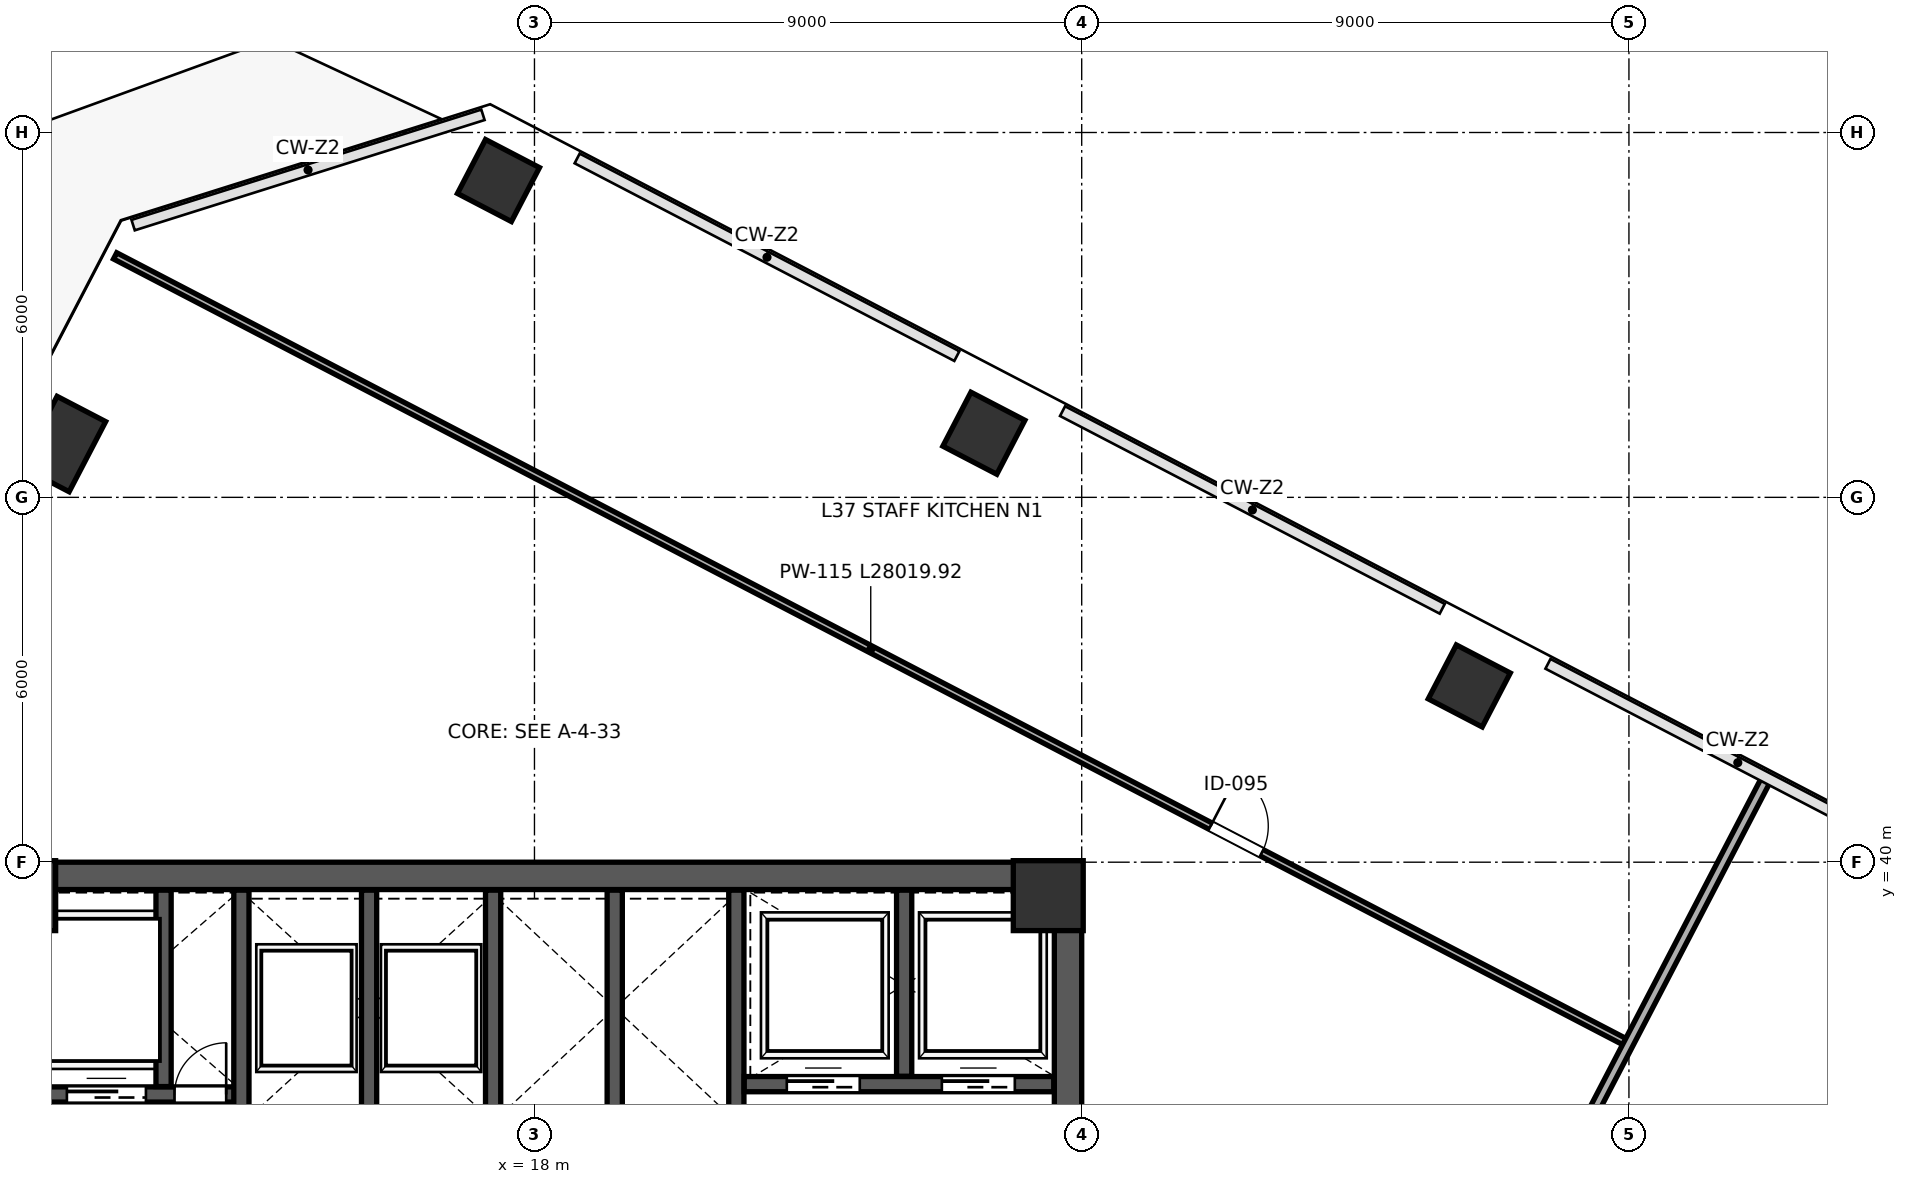
"""IFC4 building model, lengths in metres.
Left out: names, types, materials, properties, quantities, classifications, styles, units other than length and angle.
Written with IfcOpenShell. Run it as: python <this file> out.ifc"""

import sys

from ifc_helpers import new_model, si_unit, direction, frame, frame_2d, origin, origin_2d, place, context, subcontext, project, spatial, rectangle, extrude, source, transform, mapped, element, fill, save


model = new_model("IFC4")
c1 = context("Model", 3, precision=1e-05, world=origin(), true_north=direction((0.0, 1.0)))
c2 = subcontext(c1, "Body", "Model", "MODEL_VIEW")
j1 = project(units=[si_unit("LENGTHUNIT", "METRE"), si_unit("PLANEANGLEUNIT", "RADIAN")], contexts=[c1])
p1 = place(None, origin())
s1 = spatial("IfcSite", under=j1, at=p1, CompositionType="ELEMENT")
p2 = place(p1, origin())
s2 = spatial("IfcBuilding", under=s1, at=p2, CompositionType="ELEMENT")
p3 = place(p2, frame((0.0, 0.0, 166.6)))
s3 = spatial("IfcBuildingStorey", under=s2, at=p3, CompositionType="ELEMENT", Elevation=166.6)
m1 = source(origin(), c2, "Body", "SweptSolid", [
    extrude(rectangle(XDim=1.15, YDim=1.15, at=origin_2d()), origin(), (0.0, 0.0, 1.0), 4.198),
])
for number, where, z_axis, x_axis in (
    (1, (9.55, 39.45, 0.001), (0.0, 0.0, 1.0), (1.0, 0.0, 0.0)),
    (2, (26.45, 39.45, 0.001), (0.0, 0.0, 1.0), (1.0, 0.0, 0.0)),
):
    element("IfcColumn", number, at=place(p3, frame(where, z_axis=z_axis, x_axis=x_axis)), inside=s3, PredefinedType="COLUMN", context=c2, shape_type="MappedRepresentation", body=[
        mapped(m1, transform((0.0, 0.0, 0.0), scale=1.0)),
    ])
m2 = source(origin(), c2, "Body", "SweptSolid", [
    extrude(rectangle(XDim=1.0, YDim=1.0, at=origin_2d()), origin(), (0.0, 0.0, 1.0), 4.198),
])
for number, where, z_axis, x_axis in (
    (3, (17.408, 51.21, 0.001), (0.0, 0.0, 1.0), (-0.887, 0.462, 0.0)),
    (4, (25.391, 47.054, 0.001), (0.0, 0.0, 1.0), (-0.887, 0.462, 0.0)),
    (5, (33.374, 42.899, 0.001), (0.0, 0.0, 1.0), (-0.887, 0.462, 0.0)),
):
    element("IfcColumn", number, at=place(p3, frame(where, z_axis=z_axis, x_axis=x_axis)), inside=s3, PredefinedType="COLUMN", context=c2, shape_type="MappedRepresentation", body=[
        mapped(m2, transform((0.0, 0.0, 0.0), scale=1.0)),
    ])
m3 = source(origin(), c2, "Body", "SweptSolid", [
    extrude(rectangle(XDim=0.9, YDim=1.3, at=origin_2d()), origin(), (0.0, 0.0, 1.0), 4.198),
])
p4 = place(p3, frame((10.248, 46.877, 0.001), z_axis=(0.0, 0.0, 1.0), x_axis=(-0.887010833178, 0.461748613235, 0.0)))
e6 = element("IfcColumn", 6, at=p4, inside=s3, PredefinedType="PILASTER", context=c2, shape_type="MappedRepresentation", body=[
    mapped(m3, transform((0.0, 0.0, 0.0), scale=1.0)),
])
p5 = place(p3, frame((26.775, 24.45, 0.0), z_axis=(0.0, 0.0, 1.0), x_axis=(0.0, 1.0, 0.0)))
e7 = element("IfcWall", 7, at=p5, inside=s3, PredefinedType="SHEAR", context=c2, shape_type="SweptSolid", body=[
    extrude(rectangle(XDim=15.1, YDim=0.45, at=frame_2d((7.55, 0.0))), origin(), (0.0, 0.0, 1.0), 3.96),
])
p6 = place(p5, frame((8.6, 0.0, 0.0)))
e8 = element("IfcOpeningElement", 8, at=p6, cuts=e7, PredefinedType="OPENING", context=c2, shape_type="SweptSolid", body=[
    extrude(rectangle(XDim=1.15, YDim=2.2, at=frame_2d((0.575, 1.1))), frame((0.0, 0.235, 0.0), z_axis=(0.0, -1.0, 0.0), x_axis=(1.0, 0.0, 0.0)), (0.0, 0.0, 1.0), 0.47),
])
p7 = place(p3, frame((9.0, 39.775, 0.0), z_axis=(0.0, 0.0, 1.0), x_axis=(1.0, 0.0, 0.0)))
e9 = element("IfcWall", 9, at=p7, inside=s3, PredefinedType="SHEAR", context=c2, shape_type="SweptSolid", body=[
    extrude(rectangle(XDim=18.0, YDim=0.45, at=frame_2d((9.0, 0.0))), origin(), (0.0, 0.0, 1.0), 3.96),
])
p8 = place(p3, frame((21.32, 32.12, 0.0), z_axis=(0.0, 0.0, 1.0), x_axis=(0.0, 1.0, 0.0)))
e10 = element("IfcWall", 10, at=p8, inside=s3, PredefinedType="SHEAR", context=c2, shape_type="SweptSolid", body=[
    extrude(rectangle(XDim=7.42, YDim=0.25, at=frame_2d((3.71, 0.0))), origin(), (0.0, 0.0, 1.0), 3.96),
])
p9 = place(p8, frame((1.4, 0.0, 0.0)))
e11 = element("IfcOpeningElement", 11, at=p9, cuts=e10, PredefinedType="OPENING", context=c2, shape_type="SweptSolid", body=[
    extrude(rectangle(XDim=1.15, YDim=2.2, at=frame_2d((0.575, 1.1))), frame((0.0, 0.135, 0.0), z_axis=(0.0, -1.0, 0.0), x_axis=(1.0, 0.0, 0.0)), (0.0, 0.0, 1.0), 0.27),
])
p10 = place(p3, frame((9.46, 36.18, 0.0), z_axis=(0.0, 0.0, 1.0), x_axis=(1.0, 0.0, 0.0)))
e12 = element("IfcWall", 12, at=p10, inside=s3, PredefinedType="SHEAR", context=c2, shape_type="SweptSolid", body=[
    extrude(rectangle(XDim=3.79, YDim=0.25, at=frame_2d((1.895, 0.0))), origin(), (0.0, 0.0, 1.0), 3.96),
])
p11 = place(p10, frame((2.62, 0.0, 0.0)))
e13 = element("IfcOpeningElement", 13, at=p11, cuts=e12, PredefinedType="OPENING", context=c2, shape_type="SweptSolid", body=[
    extrude(rectangle(XDim=0.85, YDim=2.1, at=frame_2d((0.425, 1.05))), frame((0.0, 0.135, 0.0), z_axis=(0.0, -1.0, 0.0), x_axis=(1.0, 0.0, 0.0)), (0.0, 0.0, 1.0), 0.27),
])
p12 = place(p10, frame((0.85, 0.0, 0.0)))
e14 = element("IfcOpeningElement", 14, at=p12, cuts=e12, PredefinedType="OPENING", context=c2, shape_type="SweptSolid", body=[
    extrude(rectangle(XDim=1.3, YDim=2.25, at=frame_2d((0.65, 1.125))), frame((0.0, 0.135, 0.0), z_axis=(0.0, -1.0, 0.0), x_axis=(1.0, 0.0, 0.0)), (0.0, 0.0, 1.0), 0.27),
])
p13 = place(p3, frame((11.9, 36.31, 0.0), z_axis=(0.0, 0.0, 1.0), x_axis=(0.0, 1.0, 0.0)))
e15 = element("IfcWall", 15, at=p13, inside=s3, PredefinedType="SHEAR", context=c2, shape_type="SweptSolid", body=[
    extrude(rectangle(XDim=3.23, YDim=0.25, at=frame_2d((1.615, 0.0))), origin(), (0.0, 0.0, 1.0), 3.96),
])
p14 = place(p3, frame((21.45, 36.35, 0.0), z_axis=(0.0, 0.0, 1.0), x_axis=(1.0, 0.0, 0.0)))
e16 = element("IfcWall", 16, at=p14, inside=s3, PredefinedType="SHEAR", context=c2, shape_type="SweptSolid", body=[
    extrude(rectangle(XDim=5.09, YDim=0.25, at=frame_2d((2.545, 0.0))), origin(), (0.0, 0.0, 1.0), 3.96),
])
p15 = place(p14, frame((0.7, 0.0, 0.0)))
e17 = element("IfcOpeningElement", 17, at=p15, cuts=e16, PredefinedType="OPENING", context=c2, shape_type="SweptSolid", body=[
    extrude(rectangle(XDim=1.2, YDim=2.2, at=frame_2d((0.6, 1.1))), frame((0.0, 0.135, 0.0), z_axis=(0.0, -1.0, 0.0), x_axis=(1.0, 0.0, 0.0)), (0.0, 0.0, 1.0), 0.27),
])
p16 = place(p14, frame((3.25, 0.0, 0.0)))
e18 = element("IfcOpeningElement", 18, at=p16, cuts=e16, PredefinedType="OPENING", context=c2, shape_type="SweptSolid", body=[
    extrude(rectangle(XDim=1.2, YDim=2.2, at=frame_2d((0.6, 1.1))), frame((0.0, 0.135, 0.0), z_axis=(0.0, -1.0, 0.0), x_axis=(1.0, 0.0, 0.0)), (0.0, 0.0, 1.0), 0.27),
])
p17 = place(p3, frame((24.08, 36.48, 0.0), z_axis=(0.0, 0.0, 1.0), x_axis=(0.0, 1.0, 0.0)))
e19 = element("IfcWall", 19, at=p17, inside=s3, PredefinedType="SHEAR", context=c2, shape_type="SweptSolid", body=[
    extrude(rectangle(XDim=3.06, YDim=0.25, at=frame_2d((1.53, 0.0))), origin(), (0.0, 0.0, 1.0), 3.96),
])
for number, where, z_axis, x_axis in (
    (20, (13.18, 35.81, 0.0), (0.0, 0.0, 1.0), (0.0, 1.0, 0.0)),
    (21, (15.28, 35.81, 0.0), (0.0, 0.0, 1.0), (0.0, 1.0, 0.0)),
    (22, (17.32, 35.81, 0.0), (0.0, 0.0, 1.0), (0.0, 1.0, 0.0)),
    (23, (19.32, 35.81, 0.0), (0.0, 0.0, 1.0), (0.0, 1.0, 0.0)),
):
    element("IfcWall", number, at=place(p3, frame(where, z_axis=z_axis, x_axis=x_axis)), inside=s3, PredefinedType="SHEAR", context=c2, shape_type="SweptSolid", body=[
        extrude(rectangle(XDim=3.73, YDim=0.25, at=frame_2d((1.865, 0.0))), origin(), (0.0, 0.0, 1.0), 3.96),
    ])
p18 = place(p3, frame((11.104, 49.971, 0.0), z_axis=(0.0, 0.0, 1.0), x_axis=(0.887010001249, -0.461750211353, 0.0)))
e24 = element("IfcWall", 24, at=p18, inside=s3, PredefinedType="PARTITIONING", context=c2, shape_type="SweptSolid", body=[
    extrude(rectangle(XDim=28.02, YDim=0.115, at=frame_2d((14.01, 0.0))), origin(), (0.0, 0.0, 1.0), 3.96),
])
p19 = place(p18, frame((20.31, 0.0, 0.0)))
e25 = element("IfcOpeningElement", 25, at=p19, cuts=e24, PredefinedType="OPENING", context=c2, shape_type="SweptSolid", body=[
    extrude(rectangle(XDim=0.95, YDim=2.15, at=frame_2d((0.475, 1.075))), frame((0.0, 0.067, 0.0), z_axis=(0.0, -1.0, 0.0), x_axis=(1.0, 0.0, 0.0)), (0.0, 0.0, 1.0), 0.135),
])
p20 = place(p3, frame((29.593, 24.72, 0.0), z_axis=(0.0, 0.0, 1.0), x_axis=(0.461745249096, 0.88701258443, 0.0)))
e26 = element("IfcWall", 26, at=p20, inside=s3, PredefinedType="PARTITIONING", context=c2, shape_type="SweptSolid", body=[
    extrude(rectangle(XDim=18.74, YDim=0.16, at=frame_2d((9.37, 0.0))), origin(), (0.0, 0.0, 1.0), 3.195),
])
m4 = source(origin(), c2, "Body", "SweptSolid", [
    extrude(rectangle(XDim=0.85, YDim=2.1, at=frame_2d((0.425, 1.05))), frame((0.0, 0.025, 0.0), z_axis=(0.0, -1.0, 0.0), x_axis=(1.0, 0.0, 0.0)), (0.0, 0.0, 1.0), 0.05),
])
p21 = place(p11, origin())
e27 = element("IfcDoor", 27, at=p21, inside=s3, OperationType="SINGLE_SWING_RIGHT", PredefinedType="DOOR", context=c2, shape_type="MappedRepresentation", body=[
    mapped(m4, transform((0.0, 0.0, 0.0), scale=1.0)),
])
fill(e13, e27)
m5 = source(origin(), c2, "Body", "SweptSolid", [
    extrude(rectangle(XDim=1.2, YDim=2.2, at=frame_2d((0.6, 1.1))), frame((0.0, 0.025, 0.0), z_axis=(0.0, -1.0, 0.0), x_axis=(1.0, 0.0, 0.0)), (0.0, 0.0, 1.0), 0.05),
])
p22 = place(p15, origin())
e28 = element("IfcDoor", 28, at=p22, inside=s3, OperationType="SLIDING_TO_LEFT", PredefinedType="DOOR", context=c2, shape_type="MappedRepresentation", body=[
    mapped(m5, transform((0.0, 0.0, 0.0), scale=1.0)),
])
fill(e17, e28)
p23 = place(p16, origin())
e29 = element("IfcDoor", 29, at=p23, inside=s3, OperationType="SLIDING_TO_RIGHT", PredefinedType="DOOR", context=c2, shape_type="MappedRepresentation", body=[
    mapped(m5, transform((0.0, 0.0, 0.0), scale=1.0)),
])
fill(e18, e29)
m6 = source(origin(), c2, "Body", "SweptSolid", [
    extrude(rectangle(XDim=1.3, YDim=2.25, at=frame_2d((0.65, 1.125))), frame((0.0, 0.025, 0.0), z_axis=(0.0, -1.0, 0.0), x_axis=(1.0, 0.0, 0.0)), (0.0, 0.0, 1.0), 0.05),
])
p24 = place(p12, origin())
e30 = element("IfcDoor", 30, at=p24, inside=s3, OperationType="SLIDING_TO_LEFT", PredefinedType="DOOR", context=c2, shape_type="MappedRepresentation", body=[
    mapped(m6, transform((0.0, 0.0, 0.0), scale=1.0)),
])
fill(e14, e30)
m7 = source(origin(), c2, "Body", "SweptSolid", [
    extrude(rectangle(XDim=0.95, YDim=2.15, at=frame_2d((0.475, 1.075))), frame((0.0, 0.025, 0.0), z_axis=(0.0, -1.0, 0.0), x_axis=(1.0, 0.0, 0.0)), (0.0, 0.0, 1.0), 0.05),
])
p25 = place(p19, origin())
e31 = element("IfcDoor", 31, at=p25, inside=s3, OperationType="SINGLE_SWING_LEFT", PredefinedType="DOOR", context=c2, shape_type="MappedRepresentation", body=[
    mapped(m7, transform((0.0, 0.0, 0.0), scale=1.0)),
])
fill(e25, e31)
save(model, sys.argv[1])
